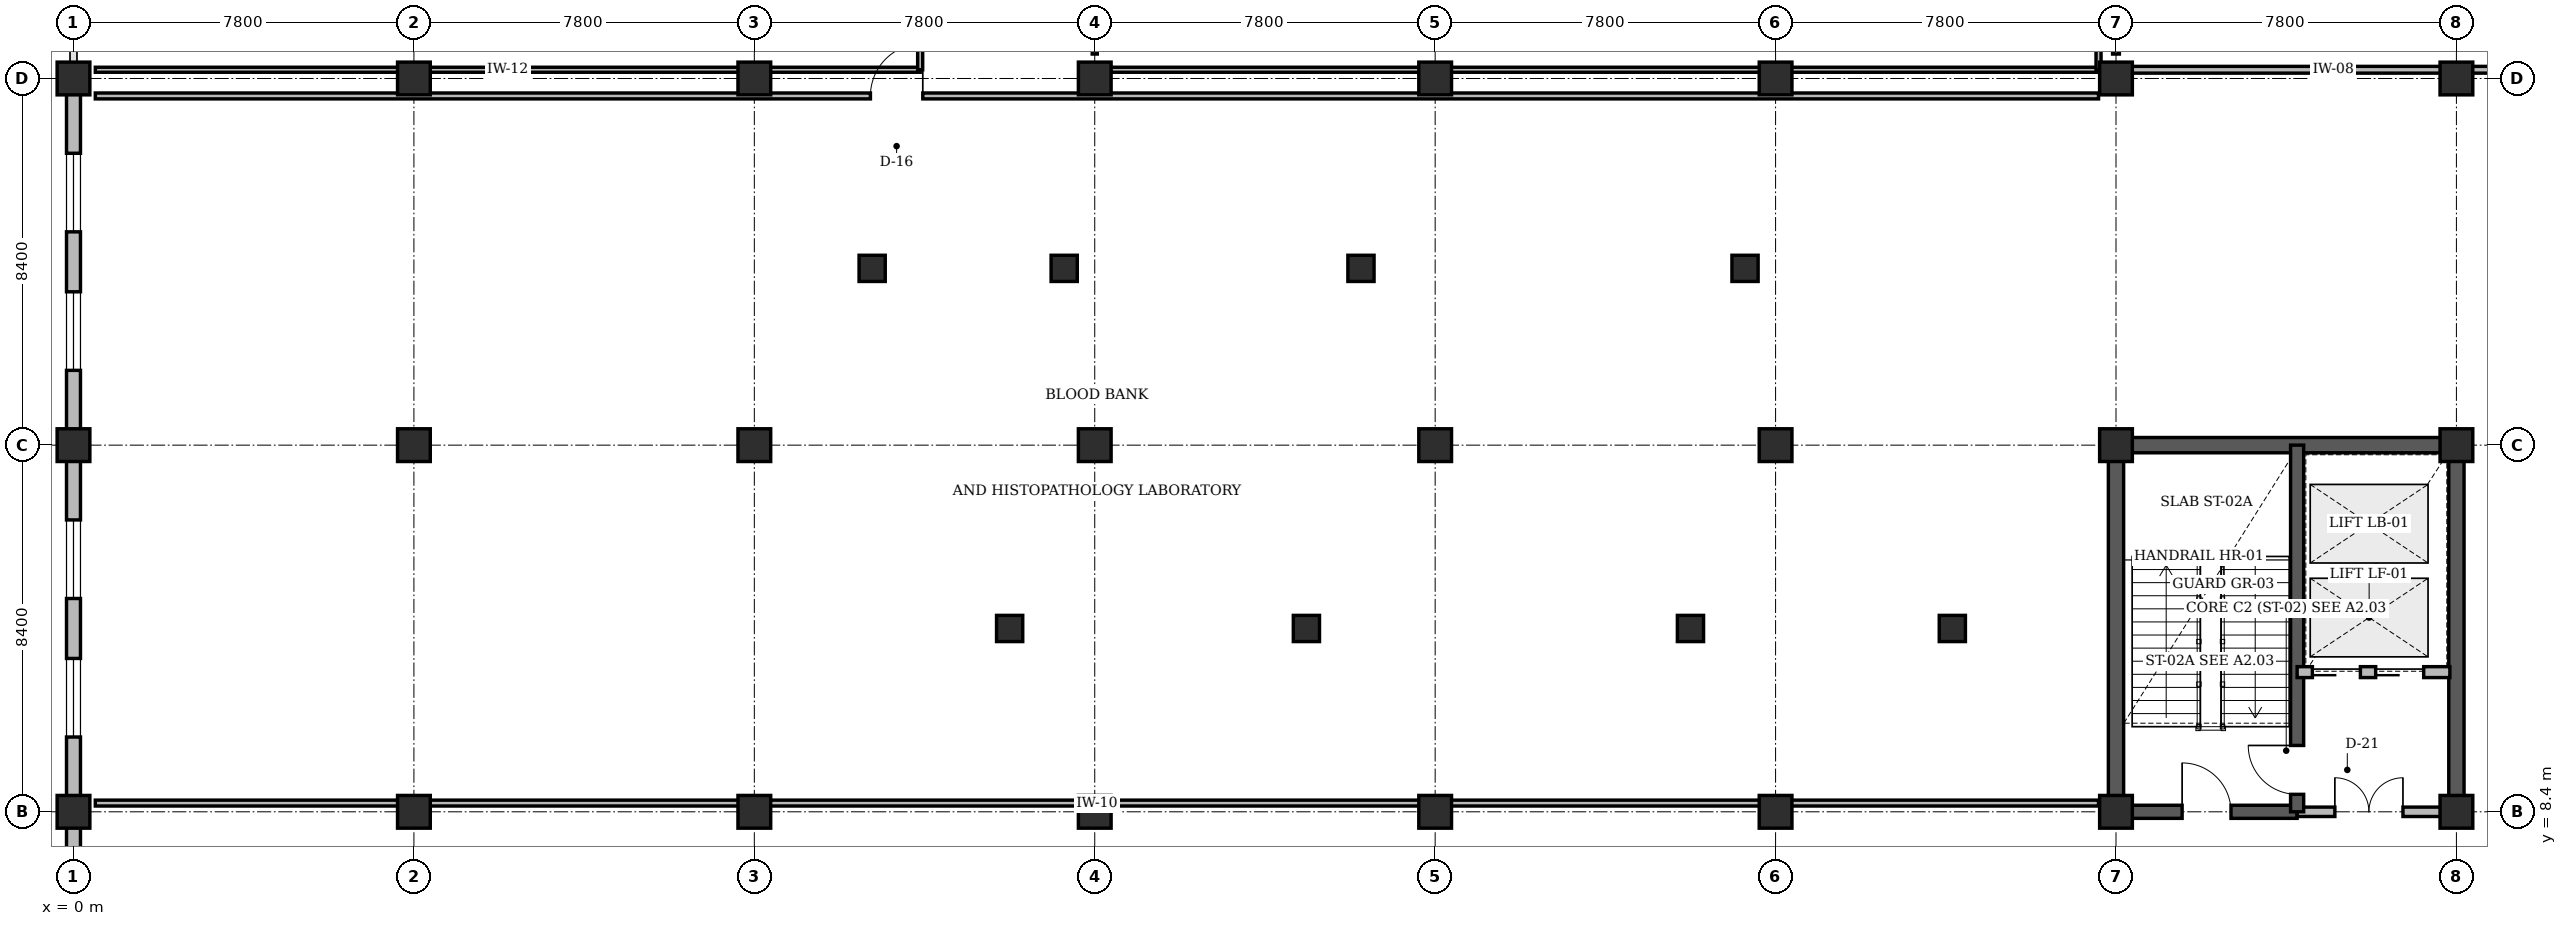
"""IFC4 building model, lengths in metres.
Left out: names, types, materials, properties, quantities, classifications, styles, units other than length and angle.
Written with IfcOpenShell. Run it as: python <this file> out.ifc"""

import sys

from ifc_helpers import new_model, si_unit, direction, frame, frame_2d, origin, origin_2d, place, context, subcontext, project, spatial, rectangle, circle, extrude, element, fill, save


model = new_model("IFC4")
c1 = context("Model", 3, precision=1e-05, world=origin(), true_north=direction((0.0, 1.0)))
c2 = subcontext(c1, "Body", "Model", "MODEL_VIEW")
j1 = project(units=[si_unit("LENGTHUNIT", "METRE"), si_unit("PLANEANGLEUNIT", "RADIAN")], contexts=[c1])
p1 = place(None, origin())
s1 = spatial("IfcSite", under=j1, at=p1, CompositionType="ELEMENT")
p2 = place(p1, origin())
s2 = spatial("IfcBuilding", under=s1, at=p2, CompositionType="ELEMENT")
p3 = place(p2, frame((0.0, 0.0, 9.6)))
s3 = spatial("IfcBuildingStorey", under=s2, at=p3, CompositionType="ELEMENT", Elevation=9.6)
p4 = place(p3, frame((46.625, 16.8, 0.0), z_axis=(0.0, 0.0, 1.0), x_axis=(1.0, 0.0, 0.0)))
e1 = element("IfcWall", 1, at=p4, inside=s3, PredefinedType="SHEAR", context=c2, shape_type="SweptSolid", body=[
    extrude(rectangle(XDim=8.15, YDim=0.35, at=frame_2d((4.075, 0.0))), origin(), (0.0, 0.0, 1.0), 4.48),
])
for number, where, z_axis, x_axis in (
    (2, (46.8, 8.4, 0.0), (0.0, 0.0, 1.0), (0.0, 1.0, 0.0)),
    (3, (54.6, 8.4, 0.0), (0.0, 0.0, 1.0), (0.0, 1.0, 0.0)),
):
    element("IfcWall", number, at=place(p3, frame(where, z_axis=z_axis, x_axis=x_axis)), inside=s3, PredefinedType="SHEAR", context=c2, shape_type="SweptSolid", body=[
        extrude(rectangle(XDim=8.4, YDim=0.35, at=frame_2d((4.2, 0.0))), origin(), (0.0, 0.0, 1.0), 4.48),
    ])
for number, where, z_axis, x_axis in (
    (4, (0.0, 8.4, 0.0), (0.0, 0.0, 1.0), (1.0, 0.0, 0.0)),
    (5, (0.0, 16.8, 0.0), (0.0, 0.0, 1.0), (1.0, 0.0, 0.0)),
    (6, (0.0, 25.2, 0.0), (0.0, 0.0, 1.0), (1.0, 0.0, 0.0)),
    (7, (7.8, 8.4, 0.0), (0.0, 0.0, 1.0), (1.0, 0.0, 0.0)),
    (8, (7.8, 16.8, 0.0), (0.0, 0.0, 1.0), (1.0, 0.0, 0.0)),
    (9, (7.8, 25.2, 0.0), (0.0, 0.0, 1.0), (1.0, 0.0, 0.0)),
    (10, (15.6, 8.4, 0.0), (0.0, 0.0, 1.0), (1.0, 0.0, 0.0)),
    (11, (15.6, 16.8, 0.0), (0.0, 0.0, 1.0), (1.0, 0.0, 0.0)),
    (12, (15.6, 25.2, 0.0), (0.0, 0.0, 1.0), (1.0, 0.0, 0.0)),
    (13, (23.4, 8.4, 0.0), (0.0, 0.0, 1.0), (1.0, 0.0, 0.0)),
    (14, (23.4, 16.8, 0.0), (0.0, 0.0, 1.0), (1.0, 0.0, 0.0)),
    (15, (23.4, 25.2, 0.0), (0.0, 0.0, 1.0), (1.0, 0.0, 0.0)),
    (16, (31.2, 8.4, 0.0), (0.0, 0.0, 1.0), (1.0, 0.0, 0.0)),
    (17, (31.2, 16.8, 0.0), (0.0, 0.0, 1.0), (1.0, 0.0, 0.0)),
    (18, (31.2, 25.2, 0.0), (0.0, 0.0, 1.0), (1.0, 0.0, 0.0)),
    (19, (39.0, 8.4, 0.0), (0.0, 0.0, 1.0), (1.0, 0.0, 0.0)),
    (20, (39.0, 16.8, 0.0), (0.0, 0.0, 1.0), (1.0, 0.0, 0.0)),
    (21, (39.0, 25.2, 0.0), (0.0, 0.0, 1.0), (1.0, 0.0, 0.0)),
    (22, (46.8, 8.4, 0.0), (0.0, 0.0, 1.0), (1.0, 0.0, 0.0)),
    (23, (46.8, 16.8, 0.0), (0.0, 0.0, 1.0), (1.0, 0.0, 0.0)),
    (24, (46.8, 25.2, 0.0), (0.0, 0.0, 1.0), (1.0, 0.0, 0.0)),
    (25, (54.6, 8.4, 0.0), (0.0, 0.0, 1.0), (1.0, 0.0, 0.0)),
    (26, (54.6, 16.8, 0.0), (0.0, 0.0, 1.0), (1.0, 0.0, 0.0)),
    (27, (54.6, 25.2, 0.0), (0.0, 0.0, 1.0), (1.0, 0.0, 0.0)),
):
    element("IfcColumn", number, at=place(p3, frame(where, z_axis=z_axis, x_axis=x_axis)), inside=s3, PredefinedType="COLUMN", context=c2, shape_type="SweptSolid", body=[
        extrude(rectangle(XDim=0.75, YDim=0.75, at=origin_2d()), origin(), (0.0, 0.0, 1.0), 4.8),
    ])
for number, where, z_axis, x_axis in (
    (28, (18.3, 20.85, 0.0), (0.0, 0.0, 1.0), (1.0, 0.0, 0.0)),
    (29, (21.45, 12.6, 0.0), (0.0, 0.0, 1.0), (1.0, 0.0, 0.0)),
    (30, (22.7, 20.85, 0.0), (0.0, 0.0, 1.0), (1.0, 0.0, 0.0)),
    (31, (28.25, 12.6, 0.0), (0.0, 0.0, 1.0), (1.0, 0.0, 0.0)),
    (32, (29.5, 20.85, 0.0), (0.0, 0.0, 1.0), (1.0, 0.0, 0.0)),
    (33, (37.05, 12.6, 0.0), (0.0, 0.0, 1.0), (1.0, 0.0, 0.0)),
    (34, (38.3, 20.85, 0.0), (0.0, 0.0, 1.0), (1.0, 0.0, 0.0)),
    (35, (43.05, 12.6, 0.0), (0.0, 0.0, 1.0), (1.0, 0.0, 0.0)),
):
    element("IfcColumn", number, at=place(p3, frame(where, z_axis=z_axis, x_axis=x_axis)), inside=s3, PredefinedType="PILASTER", context=c2, shape_type="SweptSolid", body=[
        extrude(circle(Radius=0.3, at=origin_2d()), origin(), (0.0, 0.0, 1.0), 4.8),
    ])
p5 = place(p3, frame((0.0, 0.34, 0.0), z_axis=(0.0, 0.0, 1.0), x_axis=(0.0, 1.0, 0.0)))
e36 = element("IfcWall", 36, at=p5, inside=s3, PredefinedType="STANDARD", context=c2, shape_type="SweptSolid", body=[
    extrude(rectangle(XDim=7.72, YDim=0.32, at=frame_2d((3.86, 0.0))), origin(), (0.0, 0.0, 1.0), 3.715),
])
p6 = place(p5, frame((1.373, 0.0, 0.9)))
e37 = element("IfcOpeningElement", 37, at=p6, cuts=e36, PredefinedType="OPENING", context=c2, shape_type="SweptSolid", body=[
    extrude(rectangle(XDim=1.8, YDim=1.65, at=frame_2d((0.9, 0.825))), frame((0.0, 0.17, 0.0), z_axis=(0.0, -1.0, 0.0), x_axis=(1.0, 0.0, 0.0)), (0.0, 0.0, 1.0), 0.34),
])
p7 = place(p5, frame((4.547, 0.0, 0.9)))
e38 = element("IfcOpeningElement", 38, at=p7, cuts=e36, PredefinedType="OPENING", context=c2, shape_type="SweptSolid", body=[
    extrude(rectangle(XDim=1.8, YDim=1.65, at=frame_2d((0.9, 0.825))), frame((0.0, 0.17, 0.0), z_axis=(0.0, -1.0, 0.0), x_axis=(1.0, 0.0, 0.0)), (0.0, 0.0, 1.0), 0.34),
])
p8 = place(p3, frame((0.0, 8.74, 0.0), z_axis=(0.0, 0.0, 1.0), x_axis=(0.0, 1.0, 0.0)))
e39 = element("IfcWall", 39, at=p8, inside=s3, PredefinedType="STANDARD", context=c2, shape_type="SweptSolid", body=[
    extrude(rectangle(XDim=7.72, YDim=0.32, at=frame_2d((3.86, 0.0))), origin(), (0.0, 0.0, 1.0), 3.715),
])
p9 = place(p8, frame((1.373, 0.0, 0.9)))
e40 = element("IfcOpeningElement", 40, at=p9, cuts=e39, PredefinedType="OPENING", context=c2, shape_type="SweptSolid", body=[
    extrude(rectangle(XDim=1.8, YDim=1.65, at=frame_2d((0.9, 0.825))), frame((0.0, 0.17, 0.0), z_axis=(0.0, -1.0, 0.0), x_axis=(1.0, 0.0, 0.0)), (0.0, 0.0, 1.0), 0.34),
])
p10 = place(p8, frame((4.547, 0.0, 0.9)))
e41 = element("IfcOpeningElement", 41, at=p10, cuts=e39, PredefinedType="OPENING", context=c2, shape_type="SweptSolid", body=[
    extrude(rectangle(XDim=1.8, YDim=1.65, at=frame_2d((0.9, 0.825))), frame((0.0, 0.17, 0.0), z_axis=(0.0, -1.0, 0.0), x_axis=(1.0, 0.0, 0.0)), (0.0, 0.0, 1.0), 0.34),
])
p11 = place(p3, frame((0.0, 17.14, 0.0), z_axis=(0.0, 0.0, 1.0), x_axis=(0.0, 1.0, 0.0)))
e42 = element("IfcWall", 42, at=p11, inside=s3, PredefinedType="STANDARD", context=c2, shape_type="SweptSolid", body=[
    extrude(rectangle(XDim=7.72, YDim=0.32, at=frame_2d((3.86, 0.0))), origin(), (0.0, 0.0, 1.0), 3.715),
])
p12 = place(p11, frame((1.373, 0.0, 0.9)))
e43 = element("IfcOpeningElement", 43, at=p12, cuts=e42, PredefinedType="OPENING", context=c2, shape_type="SweptSolid", body=[
    extrude(rectangle(XDim=1.8, YDim=1.65, at=frame_2d((0.9, 0.825))), frame((0.0, 0.17, 0.0), z_axis=(0.0, -1.0, 0.0), x_axis=(1.0, 0.0, 0.0)), (0.0, 0.0, 1.0), 0.34),
])
p13 = place(p11, frame((4.547, 0.0, 0.9)))
e44 = element("IfcOpeningElement", 44, at=p13, cuts=e42, PredefinedType="OPENING", context=c2, shape_type="SweptSolid", body=[
    extrude(rectangle(XDim=1.8, YDim=1.65, at=frame_2d((0.9, 0.825))), frame((0.0, 0.17, 0.0), z_axis=(0.0, -1.0, 0.0), x_axis=(1.0, 0.0, 0.0)), (0.0, 0.0, 1.0), 0.34),
])
p14 = place(p3, frame((46.8, 8.4, 0.0), z_axis=(0.0, 0.0, 1.0), x_axis=(1.0, 0.0, 0.0)))
e45 = element("IfcWall", 45, at=p14, inside=s3, PredefinedType="SHEAR", context=c2, shape_type="SweptSolid", body=[
    extrude(rectangle(XDim=4.15, YDim=0.3, at=frame_2d((2.075, 0.0))), origin(), (0.0, 0.0, 1.0), 4.8),
])
p15 = place(p14, frame((1.515, 0.0, 0.0)))
e46 = element("IfcOpeningElement", 46, at=p15, cuts=e45, PredefinedType="OPENING", context=c2, shape_type="SweptSolid", body=[
    extrude(rectangle(XDim=1.12, YDim=2.15, at=frame_2d((0.56, 1.075))), frame((0.0, 0.16, 0.0), z_axis=(0.0, -1.0, 0.0), x_axis=(1.0, 0.0, 0.0)), (0.0, 0.0, 1.0), 0.32),
])
p16 = place(p3, frame((50.95, 8.4, 0.0), z_axis=(0.0, 0.0, 1.0), x_axis=(1.0, 0.0, 0.0)))
e47 = element("IfcWall", 47, at=p16, inside=s3, PredefinedType="STANDARD", context=c2, shape_type="SweptSolid", body=[
    extrude(rectangle(XDim=3.29, YDim=0.215, at=frame_2d((1.645, 0.0))), origin(), (0.0, 0.0, 1.0), 3.73),
])
p17 = place(p16, frame((0.865, 0.0, 0.0)))
e48 = element("IfcOpeningElement", 48, at=p17, cuts=e47, PredefinedType="OPENING", context=c2, shape_type="SweptSolid", body=[
    extrude(rectangle(XDim=1.56, YDim=2.2, at=frame_2d((0.78, 1.1))), frame((0.0, 0.118, 0.0), z_axis=(0.0, -1.0, 0.0), x_axis=(1.0, 0.0, 0.0)), (0.0, 0.0, 1.0), 0.235),
])
p18 = place(p3, frame((50.95, 8.4, 0.0), z_axis=(0.0, 0.0, 1.0), x_axis=(0.0, 1.0, 0.0)))
e49 = element("IfcWall", 49, at=p18, inside=s3, PredefinedType="SHEAR", context=c2, shape_type="SweptSolid", body=[
    extrude(rectangle(XDim=8.4, YDim=0.3, at=frame_2d((4.2, 0.0))), origin(), (0.0, 0.0, 1.0), 4.8),
])
p19 = place(p18, frame((0.4, 0.0, 0.0)))
e50 = element("IfcOpeningElement", 50, at=p19, cuts=e49, PredefinedType="OPENING", context=c2, shape_type="SweptSolid", body=[
    extrude(rectangle(XDim=1.12, YDim=2.15, at=frame_2d((0.56, 1.075))), frame((0.0, 0.16, 0.0), z_axis=(0.0, -1.0, 0.0), x_axis=(1.0, 0.0, 0.0)), (0.0, 0.0, 1.0), 0.32),
])
p20 = place(p3, frame((50.95, 11.6, 0.0), z_axis=(0.0, 0.0, 1.0), x_axis=(1.0, 0.0, 0.0)))
e51 = element("IfcWall", 51, at=p20, inside=s3, PredefinedType="STANDARD", context=c2, shape_type="SweptSolid", body=[
    extrude(rectangle(XDim=3.5, YDim=0.25, at=frame_2d((1.75, 0.0))), origin(), (0.0, 0.0, 1.0), 4.46),
])
p21 = place(p20, frame((0.35, 0.0, 0.0)))
e52 = element("IfcOpeningElement", 52, at=p21, cuts=e51, PredefinedType="OPENING", context=c2, shape_type="SweptSolid", body=[
    extrude(rectangle(XDim=1.1, YDim=2.2, at=frame_2d((0.55, 1.1))), frame((0.0, 0.135, 0.0), z_axis=(0.0, -1.0, 0.0), x_axis=(1.0, 0.0, 0.0)), (0.0, 0.0, 1.0), 0.27),
])
p22 = place(p20, frame((1.8, 0.0, 0.0)))
e53 = element("IfcOpeningElement", 53, at=p22, cuts=e51, PredefinedType="OPENING", context=c2, shape_type="SweptSolid", body=[
    extrude(rectangle(XDim=1.1, YDim=2.2, at=frame_2d((0.55, 1.1))), frame((0.0, 0.135, 0.0), z_axis=(0.0, -1.0, 0.0), x_axis=(1.0, 0.0, 0.0)), (0.0, 0.0, 1.0), 0.27),
])
p23 = place(p3, frame((0.5, 25.4, 0.0), z_axis=(0.0, 0.0, 1.0), x_axis=(1.0, 0.0, 0.0)))
e54 = element("IfcWall", 54, at=p23, inside=s3, PredefinedType="PARTITIONING", context=c2, shape_type="SweptSolid", body=[
    extrude(rectangle(XDim=18.9, YDim=0.115, at=frame_2d((9.45, 0.0))), origin(), (0.0, 0.0, 1.0), 3.73),
])
p24 = place(p3, frame((19.4, 25.4, 0.0), z_axis=(0.0, 0.0, 1.0), x_axis=(0.0, 1.0, 0.0)))
e55 = element("IfcWall", 55, at=p24, inside=s3, PredefinedType="PARTITIONING", context=c2, shape_type="SweptSolid", body=[
    extrude(rectangle(XDim=24.6, YDim=0.115, at=frame_2d((12.3, 0.0))), origin(), (0.0, 0.0, 1.0), 4.46),
])
p25 = place(p24, frame((11.64, 0.0, 0.0)))
e56 = element("IfcOpeningElement", 56, at=p25, cuts=e55, PredefinedType="OPENING", context=c2, shape_type="SweptSolid", body=[
    extrude(rectangle(XDim=1.32, YDim=2.15, at=frame_2d((0.66, 1.075))), frame((0.0, 0.067, 0.0), z_axis=(0.0, -1.0, 0.0), x_axis=(1.0, 0.0, 0.0)), (0.0, 0.0, 1.0), 0.135),
])
p26 = place(p3, frame((23.76, 25.4, 0.0), z_axis=(0.0, 0.0, 1.0), x_axis=(1.0, 0.0, 0.0)))
e57 = element("IfcWall", 57, at=p26, inside=s3, PredefinedType="PARTITIONING", context=c2, shape_type="SweptSolid", body=[
    extrude(rectangle(XDim=22.64, YDim=0.115, at=frame_2d((11.32, 0.0))), origin(), (0.0, 0.0, 1.0), 3.73),
])
p27 = place(p3, frame((23.4, 25.76, 0.0), z_axis=(0.0, 0.0, 1.0), x_axis=(0.0, 1.0, 0.0)))
e58 = element("IfcWall", 58, at=p27, inside=s3, PredefinedType="PARTITIONING", context=c2, shape_type="SweptSolid", body=[
    extrude(rectangle(XDim=21.24, YDim=0.115, at=frame_2d((10.62, 0.0))), origin(), (0.0, 0.0, 1.0), 3.715),
])
p28 = place(p3, frame((46.4, 25.4, 0.0), z_axis=(0.0, 0.0, 1.0), x_axis=(0.0, 1.0, 0.0)))
e59 = element("IfcWall", 59, at=p28, inside=s3, PredefinedType="PARTITIONING", context=c2, shape_type="SweptSolid", body=[
    extrude(rectangle(XDim=21.6, YDim=0.115, at=frame_2d((10.8, 0.0))), origin(), (0.0, 0.0, 1.0), 3.73),
])
p29 = place(p3, frame((0.5, 8.6, 0.0), z_axis=(0.0, 0.0, 1.0), x_axis=(1.0, 0.0, 0.0)))
e60 = element("IfcWall", 60, at=p29, inside=s3, PredefinedType="PARTITIONING", context=c2, shape_type="SweptSolid", body=[
    extrude(rectangle(XDim=45.9, YDim=0.135, at=frame_2d((22.95, 0.0))), origin(), (0.0, 0.0, 1.0), 3.73),
])
p30 = place(p3, frame((0.5, 24.8, 0.0), z_axis=(0.0, 0.0, 1.0), x_axis=(1.0, 0.0, 0.0)))
e61 = element("IfcWall", 61, at=p30, inside=s3, PredefinedType="PARTITIONING", context=c2, shape_type="SweptSolid", body=[
    extrude(rectangle(XDim=45.9, YDim=0.135, at=frame_2d((22.95, 0.0))), origin(), (0.0, 0.0, 1.0), 3.73),
])
p31 = place(p30, frame((17.76, 0.0, 0.0)))
e62 = element("IfcOpeningElement", 62, at=p31, cuts=e61, PredefinedType="OPENING", context=c2, shape_type="SweptSolid", body=[
    extrude(rectangle(XDim=1.2, YDim=2.15, at=frame_2d((0.6, 1.075))), frame((0.0, 0.078, 0.0), z_axis=(0.0, -1.0, 0.0), x_axis=(1.0, 0.0, 0.0)), (0.0, 0.0, 1.0), 0.155),
])
p32 = place(p3, frame((47.16, 25.4, 0.0), z_axis=(0.0, 0.0, 1.0), x_axis=(1.0, 0.0, 0.0)))
e63 = element("IfcWall", 63, at=p32, inside=s3, PredefinedType="PARTITIONING", context=c2, shape_type="SweptSolid", body=[
    extrude(rectangle(XDim=9.24, YDim=0.155, at=frame_2d((4.62, 0.0))), origin(), (0.0, 0.0, 1.0), 3.73),
])
p33 = place(p3, frame((46.8, 25.76, 0.0), z_axis=(0.0, 0.0, 1.0), x_axis=(0.0, 1.0, 0.0)))
e64 = element("IfcWall", 64, at=p33, inside=s3, PredefinedType="PARTITIONING", context=c2, shape_type="SweptSolid", body=[
    extrude(rectangle(XDim=57.48, YDim=0.155, at=frame_2d((28.74, 0.0))), origin(), (0.0, 0.0, 1.0), 3.715),
])
p34 = place(p9, origin())
e65 = element("IfcWindow", 65, at=p34, inside=s3, PartitioningType="SINGLE_PANEL", PredefinedType="WINDOW", context=c2, shape_type="SweptSolid", body=[
    extrude(rectangle(XDim=1.8, YDim=1.65, at=frame_2d((0.9, 0.825))), frame((0.0, 0.03, 0.0), z_axis=(0.0, -1.0, 0.0), x_axis=(1.0, 0.0, 0.0)), (0.0, 0.0, 1.0), 0.06),
])
fill(e40, e65)
p35 = place(p10, origin())
e66 = element("IfcWindow", 66, at=p35, inside=s3, PartitioningType="SINGLE_PANEL", PredefinedType="WINDOW", context=c2, shape_type="SweptSolid", body=[
    extrude(rectangle(XDim=1.8, YDim=1.65, at=frame_2d((0.9, 0.825))), frame((0.0, 0.03, 0.0), z_axis=(0.0, -1.0, 0.0), x_axis=(1.0, 0.0, 0.0)), (0.0, 0.0, 1.0), 0.06),
])
fill(e41, e66)
p36 = place(p12, origin())
e67 = element("IfcWindow", 67, at=p36, inside=s3, PartitioningType="SINGLE_PANEL", PredefinedType="WINDOW", context=c2, shape_type="SweptSolid", body=[
    extrude(rectangle(XDim=1.8, YDim=1.65, at=frame_2d((0.9, 0.825))), frame((0.0, 0.03, 0.0), z_axis=(0.0, -1.0, 0.0), x_axis=(1.0, 0.0, 0.0)), (0.0, 0.0, 1.0), 0.06),
])
fill(e43, e67)
p37 = place(p13, origin())
e68 = element("IfcWindow", 68, at=p37, inside=s3, PartitioningType="SINGLE_PANEL", PredefinedType="WINDOW", context=c2, shape_type="SweptSolid", body=[
    extrude(rectangle(XDim=1.8, YDim=1.65, at=frame_2d((0.9, 0.825))), frame((0.0, 0.03, 0.0), z_axis=(0.0, -1.0, 0.0), x_axis=(1.0, 0.0, 0.0)), (0.0, 0.0, 1.0), 0.06),
])
fill(e44, e68)
p38 = place(p15, origin())
e69 = element("IfcDoor", 69, at=p38, inside=s3, OperationType="SINGLE_SWING_LEFT", PredefinedType="DOOR", context=c2, shape_type="SweptSolid", body=[
    extrude(rectangle(XDim=1.12, YDim=2.15, at=frame_2d((0.56, 1.075))), frame((0.0, 0.025, 0.0), z_axis=(0.0, -1.0, 0.0), x_axis=(1.0, 0.0, 0.0)), (0.0, 0.0, 1.0), 0.05),
])
fill(e46, e69)
p39 = place(p17, origin())
e70 = element("IfcDoor", 70, at=p39, inside=s3, OperationType="DOUBLE_DOOR_SINGLE_SWING", PredefinedType="DOOR", context=c2, shape_type="SweptSolid", body=[
    extrude(rectangle(XDim=1.56, YDim=2.2, at=frame_2d((0.78, 1.1))), frame((0.0, 0.025, 0.0), z_axis=(0.0, -1.0, 0.0), x_axis=(1.0, 0.0, 0.0)), (0.0, 0.0, 1.0), 0.05),
])
fill(e48, e70)
p40 = place(p19, origin())
e71 = element("IfcDoor", 71, at=p40, inside=s3, OperationType="SINGLE_SWING_RIGHT", PredefinedType="DOOR", context=c2, shape_type="SweptSolid", body=[
    extrude(rectangle(XDim=1.12, YDim=2.15, at=frame_2d((0.56, 1.075))), frame((0.0, 0.025, 0.0), z_axis=(0.0, -1.0, 0.0), x_axis=(1.0, 0.0, 0.0)), (0.0, 0.0, 1.0), 0.05),
])
fill(e50, e71)
p41 = place(p21, origin())
e72 = element("IfcDoor", 72, at=p41, inside=s3, OperationType="SLIDING_TO_LEFT", PredefinedType="DOOR", context=c2, shape_type="SweptSolid", body=[
    extrude(rectangle(XDim=1.1, YDim=2.2, at=frame_2d((0.55, 1.1))), frame((0.0, 0.025, 0.0), z_axis=(0.0, -1.0, 0.0), x_axis=(1.0, 0.0, 0.0)), (0.0, 0.0, 1.0), 0.05),
])
fill(e52, e72)
p42 = place(p22, origin())
e73 = element("IfcDoor", 73, at=p42, inside=s3, OperationType="SLIDING_TO_LEFT", PredefinedType="DOOR", context=c2, shape_type="SweptSolid", body=[
    extrude(rectangle(XDim=1.1, YDim=2.2, at=frame_2d((0.55, 1.1))), frame((0.0, 0.025, 0.0), z_axis=(0.0, -1.0, 0.0), x_axis=(1.0, 0.0, 0.0)), (0.0, 0.0, 1.0), 0.05),
])
fill(e53, e73)
p43 = place(p31, origin())
e74 = element("IfcDoor", 74, at=p43, inside=s3, OperationType="SINGLE_SWING_RIGHT", PredefinedType="DOOR", context=c2, shape_type="SweptSolid", body=[
    extrude(rectangle(XDim=1.2, YDim=2.15, at=frame_2d((0.6, 1.075))), frame((0.0, 0.025, 0.0), z_axis=(0.0, -1.0, 0.0), x_axis=(1.0, 0.0, 0.0)), (0.0, 0.0, 1.0), 0.05),
])
fill(e62, e74)
save(model, sys.argv[1])
